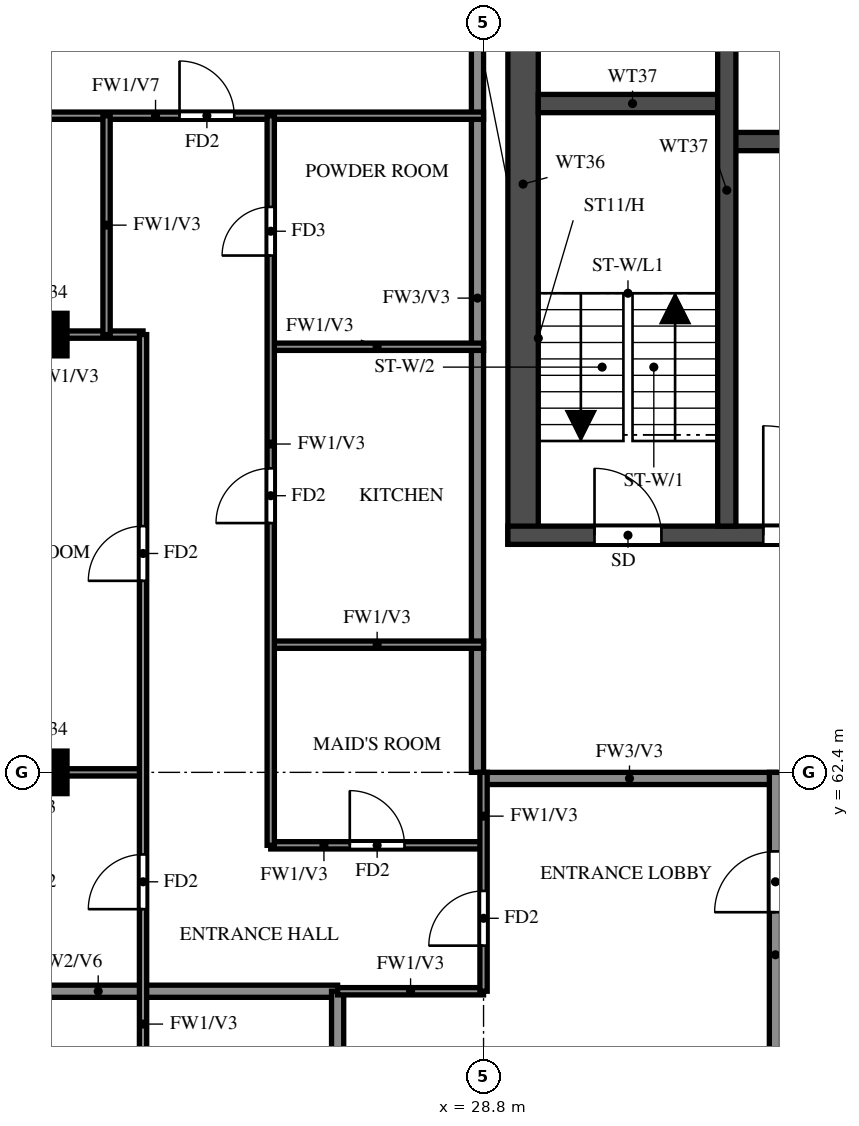
"""IFC4 building model, lengths in metres.
Left out: names, types, materials, properties, quantities, classifications, styles, units other than length and angle.
Written with IfcOpenShell. Run it as: python <this file> out.ifc"""

import sys

from ifc_helpers import new_model, si_unit, direction, frame, frame_2d, origin, origin_2d, place, context, subcontext, project, spatial, rectangle, extrude, source, transform, mapped, element, fill, save


model = new_model("IFC4")
c1 = context("Model", 3, precision=1e-05, world=origin(), true_north=direction((0.0, 1.0)))
c2 = subcontext(c1, "Body", "Model", "MODEL_VIEW")
j1 = project(units=[si_unit("LENGTHUNIT", "METRE"), si_unit("PLANEANGLEUNIT", "RADIAN")], contexts=[c1])
p1 = place(None, origin())
s1 = spatial("IfcSite", under=j1, at=p1, CompositionType="ELEMENT")
p2 = place(p1, origin())
s2 = spatial("IfcBuilding", under=s1, at=p2, CompositionType="ELEMENT")
p3 = place(p2, frame((0.0, 0.0, 257.0)))
s3 = spatial("IfcBuildingStorey", under=s2, at=p3, CompositionType="ELEMENT", Elevation=257.0)
m1 = source(origin(), c2, "Body", "SweptSolid", [
    extrude(rectangle(XDim=0.7, YDim=0.7, at=origin_2d()), origin(), (0.0, 0.0, 1.0), 3.22),
])
for number, where, z_axis, x_axis in (
    (1, (21.6, 62.4, 0.0), (0.0, 0.0, 1.0), (1.0, 0.0, 0.0)),
    (2, (21.6, 69.6, 0.0), (0.0, 0.0, 1.0), (1.0, 0.0, 0.0)),
):
    element("IfcColumn", number, at=place(p3, frame(where, z_axis=z_axis, x_axis=x_axis)), inside=s3, PredefinedType="COLUMN", context=c2, shape_type="MappedRepresentation", body=[
        mapped(m1, transform((0.0, 0.0, 0.0))),
    ])
p4 = place(p3, frame((29.45, 66.15, 0.0), z_axis=(0.0, 0.0, 1.0), x_axis=(0.0, 1.0, 0.0)))
e3 = element("IfcWall", 3, at=p4, inside=s3, PredefinedType="SHEAR", context=c2, shape_type="SweptSolid", body=[
    extrude(rectangle(XDim=11.85, YDim=0.5, at=frame_2d((5.925, 0.0))), origin(), (0.0, 0.0, 1.0), 3.22),
])
p5 = place(p3, frame((29.2, 66.3, 0.0), z_axis=(0.0, 0.0, 1.0), x_axis=(1.0, 0.0, 0.0)))
e4 = element("IfcWall", 4, at=p5, inside=s3, PredefinedType="SHEAR", context=c2, shape_type="SweptSolid", body=[
    extrude(rectangle(XDim=42.4, YDim=0.3, at=frame_2d((21.2, 0.0))), origin(), (0.0, 0.0, 1.0), 3.22),
])
p6 = place(p5, frame((1.425, 0.0, 0.0)))
e5 = element("IfcOpeningElement", 5, at=p6, cuts=e4, PredefinedType="OPENING", context=c2, shape_type="SweptSolid", body=[
    extrude(rectangle(XDim=1.1, YDim=2.1, at=frame_2d((0.55, 1.05))), frame((0.0, 0.16, 0.0), z_axis=(0.0, -1.0, 0.0), x_axis=(1.0, 0.0, 0.0)), (0.0, 0.0, 1.0), 0.32),
])
p7 = place(p5, frame((4.2, 0.0, 0.0)))
e6 = element("IfcOpeningElement", 6, at=p7, cuts=e4, PredefinedType="OPENING", context=c2, shape_type="SweptSolid", body=[
    extrude(rectangle(XDim=1.8, YDim=2.1, at=frame_2d((0.9, 1.05))), frame((0.0, 0.16, 0.0), z_axis=(0.0, -1.0, 0.0), x_axis=(1.0, 0.0, 0.0)), (0.0, 0.0, 1.0), 0.32),
])
p8 = place(p3, frame((32.8, 72.775, 0.0), z_axis=(0.0, 0.0, 1.0), x_axis=(1.0, 0.0, 0.0)))
e7 = element("IfcWall", 7, at=p8, inside=s3, PredefinedType="SHEAR", context=c2, shape_type="SweptSolid", body=[
    extrude(rectangle(XDim=35.2, YDim=0.3, at=frame_2d((17.6, 0.0))), origin(), (0.0, 0.0, 1.0), 3.22),
])
p9 = place(p8, frame((19.8, 0.0, 0.0)))
e8 = element("IfcOpeningElement", 8, at=p9, cuts=e7, PredefinedType="OPENING", context=c2, shape_type="SweptSolid", body=[
    extrude(rectangle(XDim=1.1, YDim=2.1, at=frame_2d((0.55, 1.05))), frame((0.0, 0.16, 0.0), z_axis=(0.0, -1.0, 0.0), x_axis=(1.0, 0.0, 0.0)), (0.0, 0.0, 1.0), 0.32),
])
p10 = place(p8, frame((27.725, 0.0, 0.0)))
e9 = element("IfcOpeningElement", 9, at=p10, cuts=e7, PredefinedType="OPENING", context=c2, shape_type="SweptSolid", body=[
    extrude(rectangle(XDim=1.1, YDim=2.1, at=frame_2d((0.55, 1.05))), frame((0.0, 0.16, 0.0), z_axis=(0.0, -1.0, 0.0), x_axis=(1.0, 0.0, 0.0)), (0.0, 0.0, 1.0), 0.32),
])
p11 = place(p8, frame((30.325, 0.0, 0.0)))
e10 = element("IfcOpeningElement", 10, at=p11, cuts=e7, PredefinedType="OPENING", context=c2, shape_type="SweptSolid", body=[
    extrude(rectangle(XDim=1.1, YDim=2.1, at=frame_2d((0.55, 1.05))), frame((0.0, 0.16, 0.0), z_axis=(0.0, -1.0, 0.0), x_axis=(1.0, 0.0, 0.0)), (0.0, 0.0, 1.0), 0.32),
])
p12 = place(p8, frame((3.825, 0.0, 0.0)))
e11 = element("IfcOpeningElement", 11, at=p12, cuts=e7, PredefinedType="OPENING", context=c2, shape_type="SweptSolid", body=[
    extrude(rectangle(XDim=1.1, YDim=2.1, at=frame_2d((0.55, 1.05))), frame((0.0, 0.16, 0.0), z_axis=(0.0, -1.0, 0.0), x_axis=(1.0, 0.0, 0.0)), (0.0, 0.0, 1.0), 0.32),
])
p13 = place(p8, frame((6.575, 0.0, 0.0)))
e12 = element("IfcOpeningElement", 12, at=p13, cuts=e7, PredefinedType="OPENING", context=c2, shape_type="SweptSolid", body=[
    extrude(rectangle(XDim=1.1, YDim=2.1, at=frame_2d((0.55, 1.05))), frame((0.0, 0.16, 0.0), z_axis=(0.0, -1.0, 0.0), x_axis=(1.0, 0.0, 0.0)), (0.0, 0.0, 1.0), 0.32),
])
p14 = place(p8, frame((9.325, 0.0, 0.0)))
e13 = element("IfcOpeningElement", 13, at=p14, cuts=e7, PredefinedType="OPENING", context=c2, shape_type="SweptSolid", body=[
    extrude(rectangle(XDim=1.1, YDim=2.1, at=frame_2d((0.55, 1.05))), frame((0.0, 0.16, 0.0), z_axis=(0.0, -1.0, 0.0), x_axis=(1.0, 0.0, 0.0)), (0.0, 0.0, 1.0), 0.32),
])
p15 = place(p8, frame((12.075, 0.0, 0.0)))
e14 = element("IfcOpeningElement", 14, at=p15, cuts=e7, PredefinedType="OPENING", context=c2, shape_type="SweptSolid", body=[
    extrude(rectangle(XDim=1.1, YDim=2.1, at=frame_2d((0.55, 1.05))), frame((0.0, 0.16, 0.0), z_axis=(0.0, -1.0, 0.0), x_axis=(1.0, 0.0, 0.0)), (0.0, 0.0, 1.0), 0.32),
])
p16 = place(p8, frame((14.825, 0.0, 0.0)))
e15 = element("IfcOpeningElement", 15, at=p16, cuts=e7, PredefinedType="OPENING", context=c2, shape_type="SweptSolid", body=[
    extrude(rectangle(XDim=1.1, YDim=2.1, at=frame_2d((0.55, 1.05))), frame((0.0, 0.16, 0.0), z_axis=(0.0, -1.0, 0.0), x_axis=(1.0, 0.0, 0.0)), (0.0, 0.0, 1.0), 0.32),
])
p17 = place(p8, frame((17.575, 0.0, 0.0)))
e16 = element("IfcOpeningElement", 16, at=p17, cuts=e7, PredefinedType="OPENING", context=c2, shape_type="SweptSolid", body=[
    extrude(rectangle(XDim=1.1, YDim=2.1, at=frame_2d((0.55, 1.05))), frame((0.0, 0.16, 0.0), z_axis=(0.0, -1.0, 0.0), x_axis=(1.0, 0.0, 0.0)), (0.0, 0.0, 1.0), 0.32),
])
p18 = place(p8, frame((0.95, 0.0, 0.0)))
e17 = element("IfcOpeningElement", 17, at=p18, cuts=e7, PredefinedType="OPENING", context=c2, shape_type="SweptSolid", body=[
    extrude(rectangle(XDim=1.1, YDim=2.1, at=frame_2d((0.55, 1.05))), frame((0.0, 0.16, 0.0), z_axis=(0.0, -1.0, 0.0), x_axis=(1.0, 0.0, 0.0)), (0.0, 0.0, 1.0), 0.32),
])
p19 = place(p3, frame((29.7, 73.4, 0.0), z_axis=(0.0, 0.0, 1.0), x_axis=(1.0, 0.0, 0.0)))
e18 = element("IfcWall", 18, at=p19, inside=s3, PredefinedType="SHEAR", context=c2, shape_type="SweptSolid", body=[
    extrude(rectangle(XDim=3.1, YDim=0.3, at=frame_2d((1.55, 0.0))), origin(), (0.0, 0.0, 1.0), 3.22),
])
p20 = place(p3, frame((32.8, 66.45, 0.0), z_axis=(0.0, 0.0, 1.0), x_axis=(0.0, 1.0, 0.0)))
e19 = element("IfcWall", 19, at=p20, inside=s3, PredefinedType="SHEAR", context=c2, shape_type="SweptSolid", body=[
    extrude(rectangle(XDim=11.05, YDim=0.3, at=frame_2d((5.525, 0.0))), origin(), (0.0, 0.0, 1.0), 3.22),
])
p21 = place(p3, frame((28.8, 62.3, 0.0), z_axis=(0.0, 0.0, 1.0), x_axis=(1.0, 0.0, 0.0)))
e20 = element("IfcWall", 20, at=p21, inside=s3, PredefinedType="SOLIDWALL", context=c2, shape_type="SweptSolid", body=[
    extrude(rectangle(XDim=4.8, YDim=0.2, at=frame_2d((2.4, 0.0))), origin(), (0.0, 0.0, 1.0), 3.22),
])
p22 = place(p3, frame((28.7, 62.4, 0.0), z_axis=(0.0, 0.0, 1.0), x_axis=(0.0, 1.0, 0.0)))
e21 = element("IfcWall", 21, at=p22, inside=s3, PredefinedType="SOLIDWALL", context=c2, shape_type="SweptSolid", body=[
    extrude(rectangle(XDim=15.6, YDim=0.2, at=frame_2d((7.8, 0.0))), origin(), (0.0, 0.0, 1.0), 3.22),
])
p23 = place(p3, frame((33.6, 56.4, 0.0), z_axis=(0.0, 0.0, 1.0), x_axis=(0.0, 1.0, 0.0)))
e22 = element("IfcWall", 22, at=p23, inside=s3, PredefinedType="SOLIDWALL", context=c2, shape_type="SweptSolid", body=[
    extrude(rectangle(XDim=6.0, YDim=0.2, at=frame_2d((3.0, 0.0))), origin(), (0.0, 0.0, 1.0), 3.22),
])
p24 = place(p23, frame((3.7, 0.0, 0.0)))
e23 = element("IfcOpeningElement", 23, at=p24, cuts=e22, PredefinedType="OPENING", context=c2, shape_type="SweptSolid", body=[
    extrude(rectangle(XDim=1.0, YDim=2.1, at=frame_2d((0.5, 1.05))), frame((0.0, 0.11, 0.0), z_axis=(0.0, -1.0, 0.0), x_axis=(1.0, 0.0, 0.0)), (0.0, 0.0, 1.0), 0.22),
])
p25 = place(p3, frame((18.525, 58.8, 0.0), z_axis=(0.0, 0.0, 1.0), x_axis=(1.0, 0.0, 0.0)))
e24 = element("IfcWall", 24, at=p25, inside=s3, PredefinedType="SOLIDWALL", context=c2, shape_type="SweptSolid", body=[
    extrude(rectangle(XDim=7.875, YDim=0.2, at=frame_2d((3.938, 0.0))), origin(), (0.0, 0.0, 1.0), 2.32),
])
p26 = place(p3, frame((26.4, 56.4, 0.0), z_axis=(0.0, 0.0, 1.0), x_axis=(0.0, 1.0, 0.0)))
e25 = element("IfcWall", 25, at=p26, inside=s3, PredefinedType="SOLIDWALL", context=c2, shape_type="SweptSolid", body=[
    extrude(rectangle(XDim=2.4, YDim=0.2, at=frame_2d((1.2, 0.0))), origin(), (0.0, 0.0, 1.0), 3.22),
])
p27 = place(p3, frame((26.4, 58.8, 0.0), z_axis=(0.0, 0.0, 1.0), x_axis=(1.0, 0.0, 0.0)))
e26 = element("IfcWall", 26, at=p27, inside=s3, PredefinedType="PARTITIONING", context=c2, shape_type="SweptSolid", body=[
    extrude(rectangle(XDim=2.4, YDim=0.12, at=frame_2d((1.2, 0.0))), origin(), (0.0, 0.0, 1.0), 3.22),
])
p28 = place(p3, frame((25.3, 61.2, 0.0), z_axis=(0.0, 0.0, 1.0), x_axis=(1.0, 0.0, 0.0)))
e27 = element("IfcWall", 27, at=p28, inside=s3, PredefinedType="PARTITIONING", context=c2, shape_type="SweptSolid", body=[
    extrude(rectangle(XDim=3.5, YDim=0.12, at=frame_2d((1.75, 0.0))), origin(), (0.0, 0.0, 1.0), 3.22),
])
p29 = place(p28, frame((1.3, 0.0, 0.0)))
e28 = element("IfcOpeningElement", 28, at=p29, cuts=e27, PredefinedType="OPENING", context=c2, shape_type="SweptSolid", body=[
    extrude(rectangle(XDim=0.9, YDim=2.1, at=frame_2d((0.45, 1.05))), frame((0.0, 0.07, 0.0), z_axis=(0.0, -1.0, 0.0), x_axis=(1.0, 0.0, 0.0)), (0.0, 0.0, 1.0), 0.14),
])
p30 = place(p3, frame((18.525, 62.4, 0.0), z_axis=(0.0, 0.0, 1.0), x_axis=(1.0, 0.0, 0.0)))
e29 = element("IfcWall", 29, at=p30, inside=s3, PredefinedType="PARTITIONING", context=c2, shape_type="SweptSolid", body=[
    extrude(rectangle(XDim=4.675, YDim=0.12, at=frame_2d((2.337, 0.0))), origin(), (0.0, 0.0, 1.0), 3.22),
])
for number, where, z_axis, x_axis in (
    (30, (25.3, 64.5, 0.0), (0.0, 0.0, 1.0), (1.0, 0.0, 0.0)),
    (31, (25.3, 69.4, 0.0), (0.0, 0.0, 1.0), (1.0, 0.0, 0.0)),
):
    element("IfcWall", number, at=place(p3, frame(where, z_axis=z_axis, x_axis=x_axis)), inside=s3, PredefinedType="PARTITIONING", context=c2, shape_type="SweptSolid", body=[
        extrude(rectangle(XDim=3.5, YDim=0.12, at=frame_2d((1.75, 0.0))), origin(), (0.0, 0.0, 1.0), 3.22),
    ])
p31 = place(p3, frame((18.525, 69.6, 0.0), z_axis=(0.0, 0.0, 1.0), x_axis=(1.0, 0.0, 0.0)))
e32 = element("IfcWall", 32, at=p31, inside=s3, PredefinedType="PARTITIONING", context=c2, shape_type="SweptSolid", body=[
    extrude(rectangle(XDim=4.675, YDim=0.12, at=frame_2d((2.337, 0.0))), origin(), (0.0, 0.0, 1.0), 3.22),
])
p32 = place(p31, frame((1.538, 0.0, 0.0)))
e33 = element("IfcOpeningElement", 33, at=p32, cuts=e32, PredefinedType="OPENING", context=c2, shape_type="SweptSolid", body=[
    extrude(rectangle(XDim=0.8, YDim=2.1, at=frame_2d((0.4, 1.05))), frame((0.0, 0.07, 0.0), z_axis=(0.0, -1.0, 0.0), x_axis=(1.0, 0.0, 0.0)), (0.0, 0.0, 1.0), 0.14),
])
p33 = place(p3, frame((18.525, 73.2, 0.0), z_axis=(0.0, 0.0, 1.0), x_axis=(1.0, 0.0, 0.0)))
e34 = element("IfcWall", 34, at=p33, inside=s3, PredefinedType="PARTITIONING", context=c2, shape_type="SweptSolid", body=[
    extrude(rectangle(XDim=10.275, YDim=0.12, at=frame_2d((5.138, 0.0))), origin(), (0.0, 0.0, 1.0), 2.32),
])
p34 = place(p33, frame((5.275, 0.0, 0.0)))
e35 = element("IfcOpeningElement", 35, at=p34, cuts=e34, PredefinedType="OPENING", context=c2, shape_type="SweptSolid", body=[
    extrude(rectangle(XDim=0.9, YDim=2.1, at=frame_2d((0.45, 1.05))), frame((0.0, 0.07, 0.0), z_axis=(0.0, -1.0, 0.0), x_axis=(1.0, 0.0, 0.0)), (0.0, 0.0, 1.0), 0.14),
])
p35 = place(p3, frame((22.6, 69.6, 0.0), z_axis=(0.0, 0.0, 1.0), x_axis=(0.0, 1.0, 0.0)))
e36 = element("IfcWall", 36, at=p35, inside=s3, PredefinedType="PARTITIONING", context=c2, shape_type="SweptSolid", body=[
    extrude(rectangle(XDim=3.6, YDim=0.12, at=frame_2d((1.8, 0.0))), origin(), (0.0, 0.0, 1.0), 3.22),
])
p36 = place(p3, frame((23.2, 48.0, 0.0), z_axis=(0.0, 0.0, 1.0), x_axis=(0.0, 1.0, 0.0)))
e37 = element("IfcWall", 37, at=p36, inside=s3, PredefinedType="PARTITIONING", context=c2, shape_type="SweptSolid", body=[
    extrude(rectangle(XDim=21.6, YDim=0.12, at=frame_2d((10.8, 0.0))), origin(), (0.0, 0.0, 1.0), 3.22),
])
p37 = place(p36, frame((1.35, 0.0, 0.0)))
e38 = element("IfcOpeningElement", 38, at=p37, cuts=e37, PredefinedType="OPENING", context=c2, shape_type="SweptSolid", body=[
    extrude(rectangle(XDim=0.9, YDim=2.1, at=frame_2d((0.45, 1.05))), frame((0.0, 0.07, 0.0), z_axis=(0.0, -1.0, 0.0), x_axis=(1.0, 0.0, 0.0)), (0.0, 0.0, 1.0), 0.14),
])
p38 = place(p36, frame((7.95, 0.0, 0.0)))
e39 = element("IfcOpeningElement", 39, at=p38, cuts=e37, PredefinedType="OPENING", context=c2, shape_type="SweptSolid", body=[
    extrude(rectangle(XDim=1.5, YDim=2.1, at=frame_2d((0.75, 1.05))), frame((0.0, 0.07, 0.0), z_axis=(0.0, -1.0, 0.0), x_axis=(1.0, 0.0, 0.0)), (0.0, 0.0, 1.0), 0.14),
])
p39 = place(p36, frame((12.15, 0.0, 0.0)))
e40 = element("IfcOpeningElement", 40, at=p39, cuts=e37, PredefinedType="OPENING", context=c2, shape_type="SweptSolid", body=[
    extrude(rectangle(XDim=0.9, YDim=2.1, at=frame_2d((0.45, 1.05))), frame((0.0, 0.07, 0.0), z_axis=(0.0, -1.0, 0.0), x_axis=(1.0, 0.0, 0.0)), (0.0, 0.0, 1.0), 0.14),
])
p40 = place(p36, frame((17.55, 0.0, 0.0)))
e41 = element("IfcOpeningElement", 41, at=p40, cuts=e37, PredefinedType="OPENING", context=c2, shape_type="SweptSolid", body=[
    extrude(rectangle(XDim=0.9, YDim=2.1, at=frame_2d((0.45, 1.05))), frame((0.0, 0.07, 0.0), z_axis=(0.0, -1.0, 0.0), x_axis=(1.0, 0.0, 0.0)), (0.0, 0.0, 1.0), 0.14),
])
p41 = place(p3, frame((25.3, 61.2, 0.0), z_axis=(0.0, 0.0, 1.0), x_axis=(0.0, 1.0, 0.0)))
e42 = element("IfcWall", 42, at=p41, inside=s3, PredefinedType="PARTITIONING", context=c2, shape_type="SweptSolid", body=[
    extrude(rectangle(XDim=12.0, YDim=0.12, at=frame_2d((6.0, 0.0))), origin(), (0.0, 0.0, 1.0), 3.22),
])
p42 = place(p41, frame((5.3, 0.0, 0.0)))
e43 = element("IfcOpeningElement", 43, at=p42, cuts=e42, PredefinedType="OPENING", context=c2, shape_type="SweptSolid", body=[
    extrude(rectangle(XDim=0.9, YDim=2.1, at=frame_2d((0.45, 1.05))), frame((0.0, 0.07, 0.0), z_axis=(0.0, -1.0, 0.0), x_axis=(1.0, 0.0, 0.0)), (0.0, 0.0, 1.0), 0.14),
])
p43 = place(p41, frame((9.7, 0.0, 0.0)))
e44 = element("IfcOpeningElement", 44, at=p43, cuts=e42, PredefinedType="OPENING", context=c2, shape_type="SweptSolid", body=[
    extrude(rectangle(XDim=0.8, YDim=2.1, at=frame_2d((0.4, 1.05))), frame((0.0, 0.07, 0.0), z_axis=(0.0, -1.0, 0.0), x_axis=(1.0, 0.0, 0.0)), (0.0, 0.0, 1.0), 0.14),
])
p44 = place(p3, frame((28.8, 58.8, 0.0), z_axis=(0.0, 0.0, 1.0), x_axis=(0.0, 1.0, 0.0)))
e45 = element("IfcWall", 45, at=p44, inside=s3, PredefinedType="PARTITIONING", context=c2, shape_type="SweptSolid", body=[
    extrude(rectangle(XDim=3.6, YDim=0.12, at=frame_2d((1.8, 0.0))), origin(), (0.0, 0.0, 1.0), 3.22),
])
p45 = place(p44, frame((0.75, 0.0, 0.0)))
e46 = element("IfcOpeningElement", 46, at=p45, cuts=e45, PredefinedType="OPENING", context=c2, shape_type="SweptSolid", body=[
    extrude(rectangle(XDim=0.9, YDim=2.1, at=frame_2d((0.45, 1.05))), frame((0.0, 0.07, 0.0), z_axis=(0.0, -1.0, 0.0), x_axis=(1.0, 0.0, 0.0)), (0.0, 0.0, 1.0), 0.14),
])
p46 = place(p6, origin())
e47 = element("IfcDoor", 47, at=p46, inside=s3, OperationType="SINGLE_SWING_LEFT", PredefinedType="DOOR", context=c2, shape_type="SweptSolid", body=[
    extrude(rectangle(XDim=1.1, YDim=2.1, at=frame_2d((0.55, 1.05))), frame((0.0, 0.025, 0.0), z_axis=(0.0, -1.0, 0.0), x_axis=(1.0, 0.0, 0.0)), (0.0, 0.0, 1.0), 0.05),
])
fill(e5, e47)
p47 = place(p7, origin())
e48 = element("IfcDoor", 48, at=p47, inside=s3, OperationType="DOUBLE_DOOR_SINGLE_SWING", PredefinedType="DOOR", context=c2, shape_type="SweptSolid", body=[
    extrude(rectangle(XDim=1.8, YDim=2.1, at=frame_2d((0.9, 1.05))), frame((0.0, 0.025, 0.0), z_axis=(0.0, -1.0, 0.0), x_axis=(1.0, 0.0, 0.0)), (0.0, 0.0, 1.0), 0.05),
])
fill(e6, e48)
p48 = place(p45, origin())
e49 = element("IfcDoor", 49, at=p48, inside=s3, OperationType="SINGLE_SWING_LEFT", PredefinedType="DOOR", context=c2, shape_type="SweptSolid", body=[
    extrude(rectangle(XDim=0.9, YDim=2.1, at=frame_2d((0.45, 1.05))), frame((0.0, 0.025, 0.0), z_axis=(0.0, -1.0, 0.0), x_axis=(1.0, 0.0, 0.0)), (0.0, 0.0, 1.0), 0.05),
])
fill(e46, e49)
p49 = place(p24, origin())
e50 = element("IfcDoor", 50, at=p49, inside=s3, OperationType="SINGLE_SWING_LEFT", PredefinedType="DOOR", context=c2, shape_type="SweptSolid", body=[
    extrude(rectangle(XDim=1.0, YDim=2.1, at=frame_2d((0.5, 1.05))), frame((0.0, 0.025, 0.0), z_axis=(0.0, -1.0, 0.0), x_axis=(1.0, 0.0, 0.0)), (0.0, 0.0, 1.0), 0.05),
])
fill(e23, e50)
p50 = place(p39, origin())
e51 = element("IfcDoor", 51, at=p50, inside=s3, OperationType="SINGLE_SWING_RIGHT", PredefinedType="DOOR", context=c2, shape_type="SweptSolid", body=[
    extrude(rectangle(XDim=0.9, YDim=2.1, at=frame_2d((0.45, 1.05))), frame((0.0, 0.025, 0.0), z_axis=(0.0, -1.0, 0.0), x_axis=(1.0, 0.0, 0.0)), (0.0, 0.0, 1.0), 0.05),
])
fill(e40, e51)
p51 = place(p40, origin())
e52 = element("IfcDoor", 52, at=p51, inside=s3, OperationType="SINGLE_SWING_LEFT", PredefinedType="DOOR", context=c2, shape_type="SweptSolid", body=[
    extrude(rectangle(XDim=0.9, YDim=2.1, at=frame_2d((0.45, 1.05))), frame((0.0, 0.025, 0.0), z_axis=(0.0, -1.0, 0.0), x_axis=(1.0, 0.0, 0.0)), (0.0, 0.0, 1.0), 0.05),
])
fill(e41, e52)
p52 = place(p34, origin())
e53 = element("IfcDoor", 53, at=p52, inside=s3, OperationType="SINGLE_SWING_RIGHT", PredefinedType="DOOR", context=c2, shape_type="SweptSolid", body=[
    extrude(rectangle(XDim=0.9, YDim=2.1, at=frame_2d((0.45, 1.05))), frame((0.0, 0.025, 0.0), z_axis=(0.0, -1.0, 0.0), x_axis=(1.0, 0.0, 0.0)), (0.0, 0.0, 1.0), 0.05),
])
fill(e35, e53)
p53 = place(p29, origin())
e54 = element("IfcDoor", 54, at=p53, inside=s3, OperationType="SINGLE_SWING_LEFT", PredefinedType="DOOR", context=c2, shape_type="SweptSolid", body=[
    extrude(rectangle(XDim=0.9, YDim=2.1, at=frame_2d((0.45, 1.05))), frame((0.0, 0.025, 0.0), z_axis=(0.0, -1.0, 0.0), x_axis=(1.0, 0.0, 0.0)), (0.0, 0.0, 1.0), 0.05),
])
fill(e28, e54)
p54 = place(p42, origin())
e55 = element("IfcDoor", 55, at=p54, inside=s3, OperationType="SINGLE_SWING_LEFT", PredefinedType="DOOR", context=c2, shape_type="SweptSolid", body=[
    extrude(rectangle(XDim=0.9, YDim=2.1, at=frame_2d((0.45, 1.05))), frame((0.0, 0.025, 0.0), z_axis=(0.0, -1.0, 0.0), x_axis=(1.0, 0.0, 0.0)), (0.0, 0.0, 1.0), 0.05),
])
fill(e43, e55)
p55 = place(p43, origin())
e56 = element("IfcDoor", 56, at=p55, inside=s3, OperationType="SINGLE_SWING_RIGHT", PredefinedType="DOOR", context=c2, shape_type="SweptSolid", body=[
    extrude(rectangle(XDim=0.8, YDim=2.1, at=frame_2d((0.4, 1.05))), frame((0.0, 0.025, 0.0), z_axis=(0.0, -1.0, 0.0), x_axis=(1.0, 0.0, 0.0)), (0.0, 0.0, 1.0), 0.05),
])
fill(e44, e56)
save(model, sys.argv[1])
